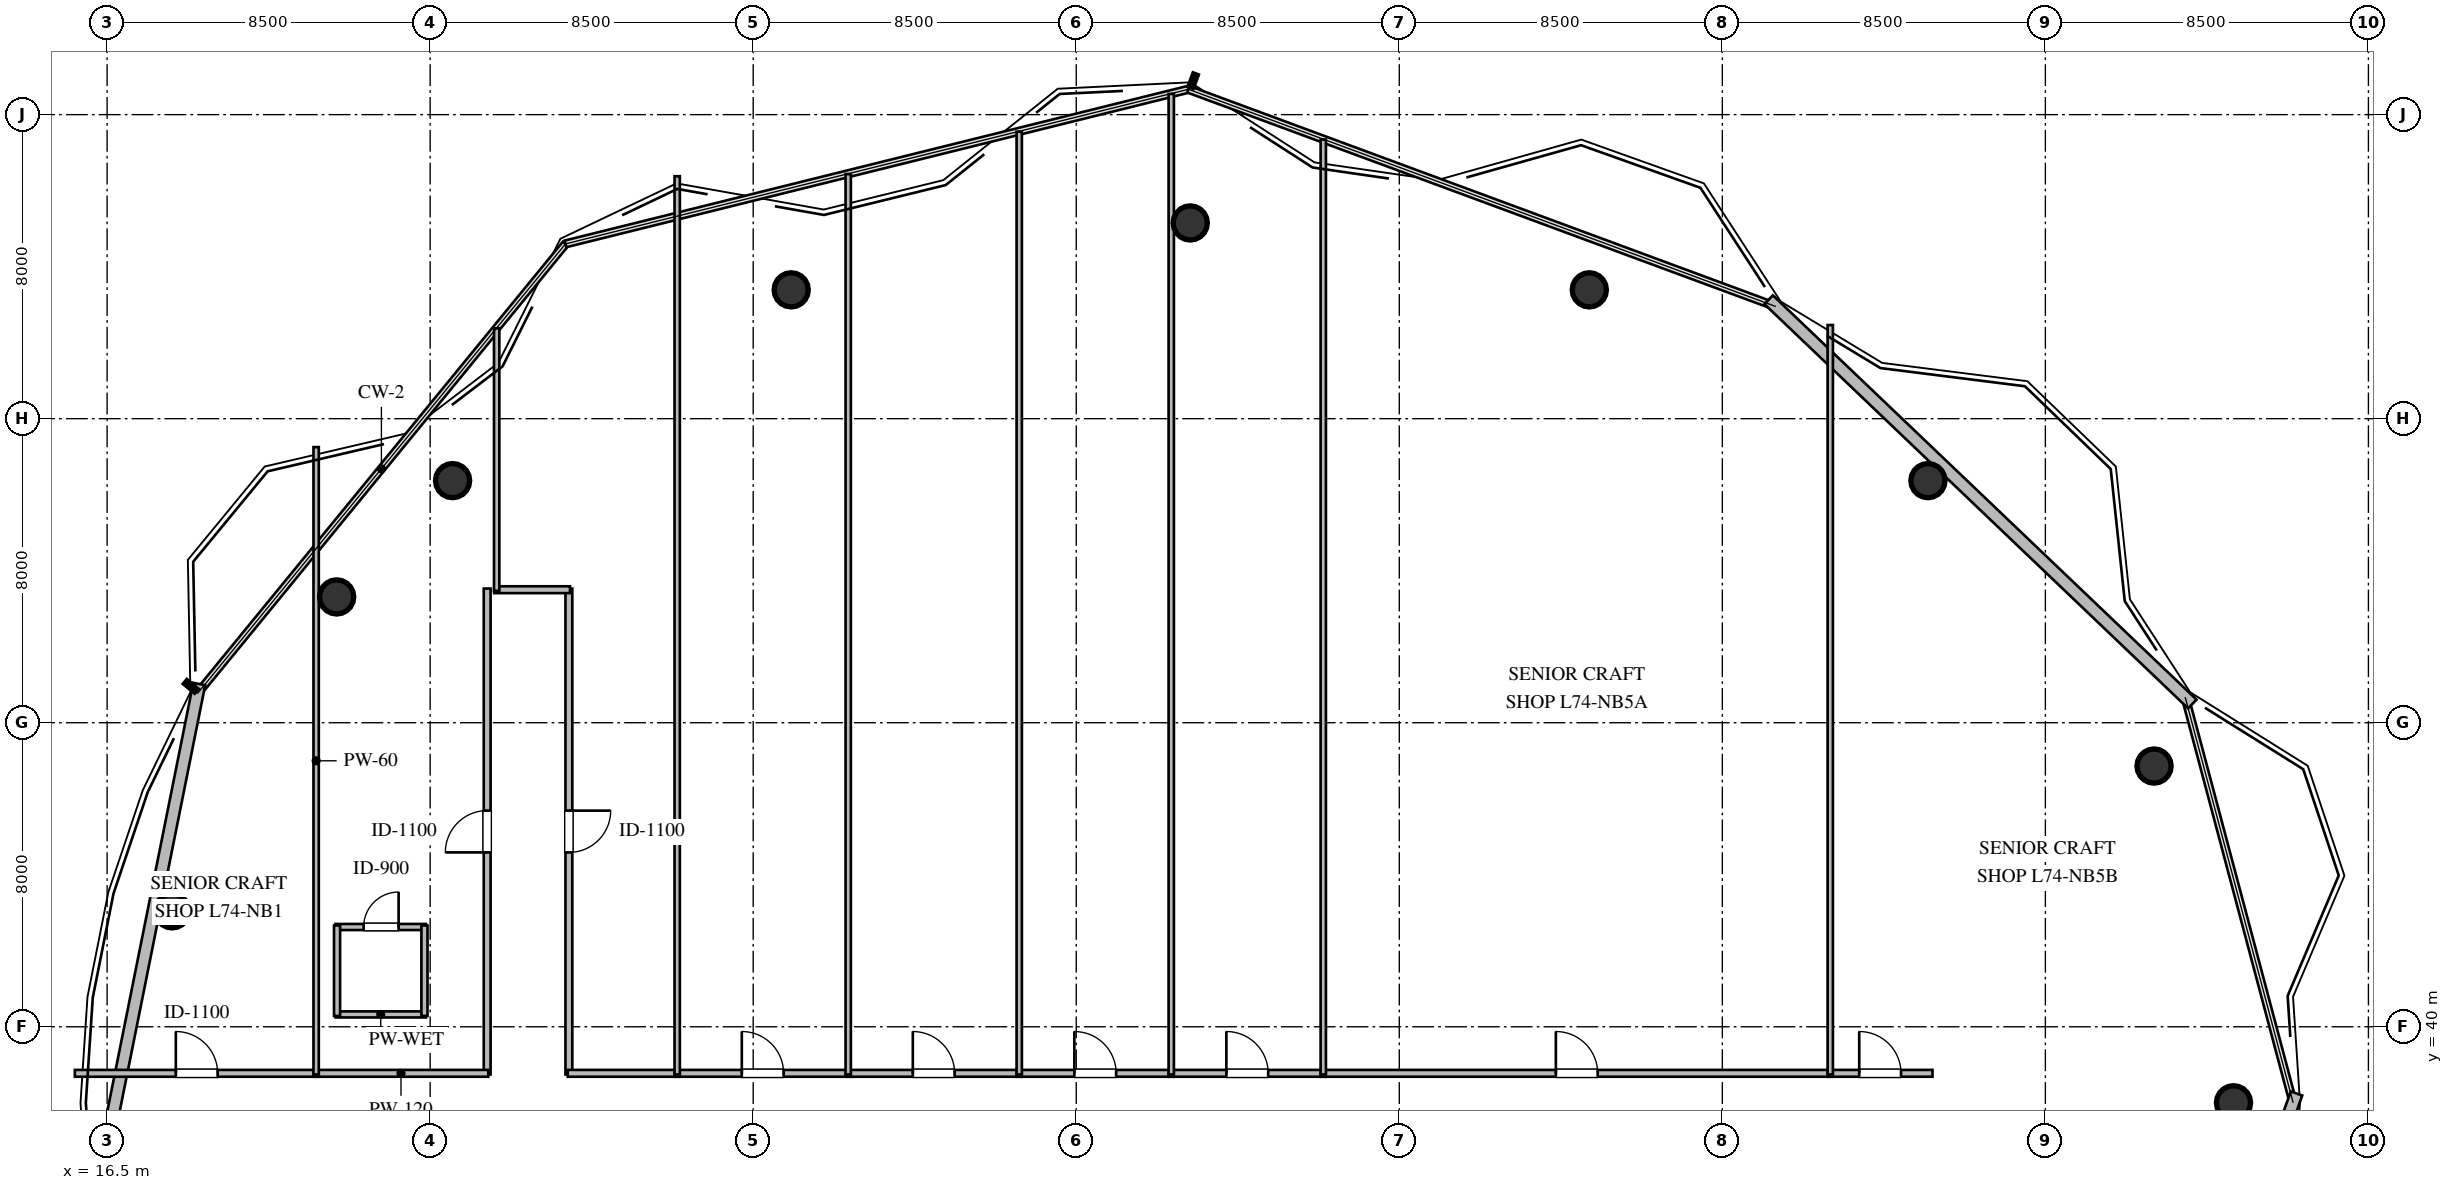
"""IFC4 building model, lengths in metres.
Left out: names, types, materials, properties, quantities, classifications, styles, units other than length and angle.
Written with IfcOpenShell. Run it as: python <this file> out.ifc"""

import sys

from ifc_helpers import new_model, si_unit, direction, frame, frame_2d, origin, origin_2d, place, context, subcontext, project, spatial, rectangle, circle, extrude, element, fill, save


model = new_model("IFC4")
c1 = context("Model", 3, precision=1e-05, world=origin(), true_north=direction((0.0, 1.0)))
c2 = subcontext(c1, "Body", "Model", "MODEL_VIEW")
j1 = project(units=[si_unit("LENGTHUNIT", "METRE"), si_unit("PLANEANGLEUNIT", "RADIAN")], contexts=[c1])
p1 = place(None, origin())
s1 = spatial("IfcSite", under=j1, at=p1, CompositionType="ELEMENT")
p2 = place(p1, origin())
s2 = spatial("IfcBuilding", under=s1, at=p2, CompositionType="ELEMENT")
p3 = place(p2, frame((0.0, 0.0, 281.4)))
s3 = spatial("IfcBuildingStorey", under=s2, at=p3, CompositionType="ELEMENT", Elevation=281.4)
for number, where, z_axis, x_axis in (
    (1, (72.45, 38.0, 0.0), (0.0, 0.0, 1.0), (1.0, 0.0, 0.0)),
    (2, (70.36, 46.86, 0.0), (0.0, 0.0, 1.0), (1.0, 0.0, 0.0)),
    (3, (64.41, 54.37, 0.0), (0.0, 0.0, 1.0), (1.0, 0.0, 0.0)),
    (4, (55.5, 59.39, 0.0), (0.0, 0.0, 1.0), (1.0, 0.0, 0.0)),
    (5, (45.0, 61.15, 0.0), (0.0, 0.0, 1.0), (1.0, 0.0, 0.0)),
    (6, (34.5, 59.39, 0.0), (0.0, 0.0, 1.0), (1.0, 0.0, 0.0)),
    (7, (25.59, 54.37, 0.0), (0.0, 0.0, 1.0), (1.0, 0.0, 0.0)),
    (8, (22.54, 51.31, 0.0), (0.0, 0.0, 1.0), (1.0, 0.0, 0.0)),
    (9, (18.21, 43.05, 0.0), (0.0, 0.0, 1.0), (1.0, 0.0, 0.0)),
):
    element("IfcColumn", number, at=place(p3, frame(where, z_axis=z_axis, x_axis=x_axis)), inside=s3, PredefinedType="COLUMN", context=c2, shape_type="SweptSolid", body=[
        extrude(circle(Radius=0.45, at=origin_2d()), origin(), (0.0, 0.0, 1.0), 3.8),
    ])
p4 = place(p3, frame((74.108, 38.245, 0.0), z_axis=(0.0, 0.0, 1.0), x_axis=(-0.337073777429, -0.941478235845, 0.0)))
e10 = element("IfcWall", 10, at=p4, inside=s3, PredefinedType="STANDARD", context=c2, shape_type="SweptSolid", body=[
    extrude(rectangle(XDim=13.673, YDim=0.32, at=frame_2d((6.837, 0.0))), origin(), (0.0, 0.0, 1.0), 3.56),
])
p5 = place(p3, frame((16.111, 34.999, 0.0), z_axis=(0.0, 0.0, 1.0), x_axis=(0.196720235208, 0.980459662128, 0.0)))
e11 = element("IfcWall", 11, at=p5, inside=s3, PredefinedType="STANDARD", context=c2, shape_type="SweptSolid", body=[
    extrude(rectangle(XDim=14.299, YDim=0.32, at=frame_2d((7.15, 0.0))), origin(), (0.0, 0.0, 1.0), 3.56),
])
p6 = place(p3, frame((60.219, 59.13, 0.0), z_axis=(0.0, 0.0, 1.0), x_axis=(0.723493659852, -0.690331025056, 0.0)))
e12 = element("IfcWall", 12, at=p6, inside=s3, PredefinedType="STANDARD", context=c2, shape_type="SweptSolid", body=[
    extrude(rectangle(XDim=15.408, YDim=0.32, at=frame_2d((7.704, 0.0))), origin(), (0.0, 0.0, 1.0), 3.56),
])
p7 = place(p3, frame((22.51, 40.325, 0.0), z_axis=(0.0, 0.0, 1.0), x_axis=(1.0, 0.0, 0.0)))
e13 = element("IfcWall", 13, at=p7, inside=s3, PredefinedType="PLUMBINGWALL", context=c2, shape_type="SweptSolid", body=[
    extrude(rectangle(XDim=2.38, YDim=0.16, at=frame_2d((1.19, 0.0))), origin(), (0.0, 0.0, 1.0), 3.56),
])
p8 = place(p3, frame((22.51, 42.625, 0.0), z_axis=(0.0, 0.0, 1.0), x_axis=(1.0, 0.0, 0.0)))
e14 = element("IfcWall", 14, at=p8, inside=s3, PredefinedType="PLUMBINGWALL", context=c2, shape_type="SweptSolid", body=[
    extrude(rectangle(XDim=2.38, YDim=0.16, at=frame_2d((1.19, 0.0))), origin(), (0.0, 0.0, 1.0), 3.56),
])
p9 = place(p8, frame((0.74, 0.0, 0.0)))
e15 = element("IfcOpeningElement", 15, at=p9, cuts=e14, PredefinedType="OPENING", context=c2, shape_type="SweptSolid", body=[
    extrude(rectangle(XDim=0.92, YDim=2.1, at=frame_2d((0.46, 1.05))), frame((0.0, 0.09, 0.0), z_axis=(0.0, -1.0, 0.0), x_axis=(1.0, 0.0, 0.0)), (0.0, 0.0, 1.0), 0.18),
])
p10 = place(p3, frame((22.55, 40.285, 0.0), z_axis=(0.0, 0.0, 1.0), x_axis=(0.0, 1.0, 0.0)))
e16 = element("IfcWall", 16, at=p10, inside=s3, PredefinedType="PLUMBINGWALL", context=c2, shape_type="SweptSolid", body=[
    extrude(rectangle(XDim=2.38, YDim=0.16, at=frame_2d((1.19, 0.0))), origin(), (0.0, 0.0, 1.0), 3.006),
])
p11 = place(p3, frame((24.85, 40.285, 0.0), z_axis=(0.0, 0.0, 1.0), x_axis=(0.0, 1.0, 0.0)))
e17 = element("IfcWall", 17, at=p11, inside=s3, PredefinedType="PLUMBINGWALL", context=c2, shape_type="SweptSolid", body=[
    extrude(rectangle(XDim=2.38, YDim=0.16, at=frame_2d((1.19, 0.0))), origin(), (0.0, 0.0, 1.0), 3.56),
])
p12 = place(p3, frame((15.651, 38.775, 0.0), z_axis=(0.0, 0.0, 1.0), x_axis=(1.0, 0.0, 0.0)))
e18 = element("IfcWall", 18, at=p12, inside=s3, PredefinedType="PARTITIONING", context=c2, shape_type="SweptSolid", body=[
    extrude(rectangle(XDim=6.414, YDim=0.18, at=frame_2d((3.207, 0.0))), origin(), (0.0, 0.0, 1.0), 3.56),
])
p13 = place(p12, frame((2.657, 0.0, 0.0)))
e19 = element("IfcOpeningElement", 19, at=p13, cuts=e18, PredefinedType="OPENING", context=c2, shape_type="SweptSolid", body=[
    extrude(rectangle(XDim=1.1, YDim=2.1, at=frame_2d((0.55, 1.05))), frame((0.0, 0.1, 0.0), z_axis=(0.0, -1.0, 0.0), x_axis=(1.0, 0.0, 0.0)), (0.0, 0.0, 1.0), 0.2),
])
p14 = place(p3, frame((26.5, 38.745, 0.0), z_axis=(0.0, 0.0, 1.0), x_axis=(0.0, 1.0, 0.0)))
e20 = element("IfcWall", 20, at=p14, inside=s3, PredefinedType="PARTITIONING", context=c2, shape_type="SweptSolid", body=[
    extrude(rectangle(XDim=12.785, YDim=0.18, at=frame_2d((6.393, 0.0))), origin(), (0.0, 0.0, 1.0), 3.56),
])
p15 = place(p14, frame((5.843, 0.0, 0.0)))
e21 = element("IfcOpeningElement", 21, at=p15, cuts=e20, PredefinedType="OPENING", context=c2, shape_type="SweptSolid", body=[
    extrude(rectangle(XDim=1.1, YDim=2.1, at=frame_2d((0.55, 1.05))), frame((0.0, 0.1, 0.0), z_axis=(0.0, -1.0, 0.0), x_axis=(1.0, 0.0, 0.0)), (0.0, 0.0, 1.0), 0.2),
])
p16 = place(p3, frame((21.935, 38.775, 0.0), z_axis=(0.0, 0.0, 1.0), x_axis=(1.0, 0.0, 0.0)))
e22 = element("IfcWall", 22, at=p16, inside=s3, PredefinedType="PARTITIONING", context=c2, shape_type="SweptSolid", body=[
    extrude(rectangle(XDim=4.595, YDim=0.18, at=frame_2d((2.297, 0.0))), origin(), (0.0, 0.0, 1.0), 3.56),
])
p17 = place(p3, frame((28.65, 51.53, 0.0), z_axis=(0.0, 0.0, 1.0), x_axis=(0.0, -1.0, 0.0)))
e23 = element("IfcWall", 23, at=p17, inside=s3, PredefinedType="PARTITIONING", context=c2, shape_type="SweptSolid", body=[
    extrude(rectangle(XDim=12.785, YDim=0.18, at=frame_2d((6.393, 0.0))), origin(), (0.0, 0.0, 1.0), 3.56),
])
p18 = place(p17, frame((5.843, 0.0, 0.0)))
e24 = element("IfcOpeningElement", 24, at=p18, cuts=e23, PredefinedType="OPENING", context=c2, shape_type="SweptSolid", body=[
    extrude(rectangle(XDim=1.1, YDim=2.1, at=frame_2d((0.55, 1.05))), frame((0.0, 0.1, 0.0), z_axis=(0.0, -1.0, 0.0), x_axis=(1.0, 0.0, 0.0)), (0.0, 0.0, 1.0), 0.2),
])
p19 = place(p3, frame((28.62, 38.775, 0.0), z_axis=(0.0, 0.0, 1.0), x_axis=(1.0, 0.0, 0.0)))
e25 = element("IfcWall", 25, at=p19, inside=s3, PredefinedType="PARTITIONING", context=c2, shape_type="SweptSolid", body=[
    extrude(rectangle(XDim=2.945, YDim=0.18, at=frame_2d((1.472, 0.0))), origin(), (0.0, 0.0, 1.0), 3.56),
])
p20 = place(p3, frame((26.685, 51.5, 0.0), z_axis=(0.0, 0.0, 1.0), x_axis=(1.0, 0.0, 0.0)))
e26 = element("IfcWall", 26, at=p20, inside=s3, PredefinedType="PARTITIONING", context=c2, shape_type="SweptSolid", body=[
    extrude(rectangle(XDim=1.995, YDim=0.18, at=frame_2d((0.998, 0.0))), origin(), (0.0, 0.0, 1.0), 3.56),
])
p21 = place(p3, frame((31.435, 38.775, 0.0), z_axis=(0.0, 0.0, 1.0), x_axis=(1.0, 0.0, 0.0)))
e27 = element("IfcWall", 27, at=p21, inside=s3, PredefinedType="PARTITIONING", context=c2, shape_type="SweptSolid", body=[
    extrude(rectangle(XDim=4.63, YDim=0.18, at=frame_2d((2.315, 0.0))), origin(), (0.0, 0.0, 1.0), 3.56),
])
p22 = place(p21, frame((1.765, 0.0, 0.0)))
e28 = element("IfcOpeningElement", 28, at=p22, cuts=e27, PredefinedType="OPENING", context=c2, shape_type="SweptSolid", body=[
    extrude(rectangle(XDim=1.1, YDim=2.1, at=frame_2d((0.55, 1.05))), frame((0.0, 0.1, 0.0), z_axis=(0.0, -1.0, 0.0), x_axis=(1.0, 0.0, 0.0)), (0.0, 0.0, 1.0), 0.2),
])
p23 = place(p3, frame((35.935, 38.775, 0.0), z_axis=(0.0, 0.0, 1.0), x_axis=(1.0, 0.0, 0.0)))
e29 = element("IfcWall", 29, at=p23, inside=s3, PredefinedType="PARTITIONING", context=c2, shape_type="SweptSolid", body=[
    extrude(rectangle(XDim=4.63, YDim=0.18, at=frame_2d((2.315, 0.0))), origin(), (0.0, 0.0, 1.0), 3.56),
])
p24 = place(p23, frame((1.765, 0.0, 0.0)))
e30 = element("IfcOpeningElement", 30, at=p24, cuts=e29, PredefinedType="OPENING", context=c2, shape_type="SweptSolid", body=[
    extrude(rectangle(XDim=1.1, YDim=2.1, at=frame_2d((0.55, 1.05))), frame((0.0, 0.1, 0.0), z_axis=(0.0, -1.0, 0.0), x_axis=(1.0, 0.0, 0.0)), (0.0, 0.0, 1.0), 0.2),
])
p25 = place(p3, frame((40.435, 38.775, 0.0), z_axis=(0.0, 0.0, 1.0), x_axis=(1.0, 0.0, 0.0)))
e31 = element("IfcWall", 31, at=p25, inside=s3, PredefinedType="PARTITIONING", context=c2, shape_type="SweptSolid", body=[
    extrude(rectangle(XDim=4.13, YDim=0.18, at=frame_2d((2.065, 0.0))), origin(), (0.0, 0.0, 1.0), 3.56),
])
p26 = place(p25, frame((1.515, 0.0, 0.0)))
e32 = element("IfcOpeningElement", 32, at=p26, cuts=e31, PredefinedType="OPENING", context=c2, shape_type="SweptSolid", body=[
    extrude(rectangle(XDim=1.1, YDim=2.1, at=frame_2d((0.55, 1.05))), frame((0.0, 0.1, 0.0), z_axis=(0.0, -1.0, 0.0), x_axis=(1.0, 0.0, 0.0)), (0.0, 0.0, 1.0), 0.2),
])
p27 = place(p3, frame((44.435, 38.775, 0.0), z_axis=(0.0, 0.0, 1.0), x_axis=(1.0, 0.0, 0.0)))
e33 = element("IfcWall", 33, at=p27, inside=s3, PredefinedType="PARTITIONING", context=c2, shape_type="SweptSolid", body=[
    extrude(rectangle(XDim=4.13, YDim=0.18, at=frame_2d((2.065, 0.0))), origin(), (0.0, 0.0, 1.0), 3.56),
])
p28 = place(p27, frame((1.515, 0.0, 0.0)))
e34 = element("IfcOpeningElement", 34, at=p28, cuts=e33, PredefinedType="OPENING", context=c2, shape_type="SweptSolid", body=[
    extrude(rectangle(XDim=1.1, YDim=2.1, at=frame_2d((0.55, 1.05))), frame((0.0, 0.1, 0.0), z_axis=(0.0, -1.0, 0.0), x_axis=(1.0, 0.0, 0.0)), (0.0, 0.0, 1.0), 0.2),
])
p29 = place(p3, frame((48.435, 38.775, 0.0), z_axis=(0.0, 0.0, 1.0), x_axis=(1.0, 0.0, 0.0)))
e35 = element("IfcWall", 35, at=p29, inside=s3, PredefinedType="PARTITIONING", context=c2, shape_type="SweptSolid", body=[
    extrude(rectangle(XDim=13.47, YDim=0.18, at=frame_2d((6.735, 0.0))), origin(), (0.0, 0.0, 1.0), 3.56),
])
p30 = place(p29, frame((6.185, 0.0, 0.0)))
e36 = element("IfcOpeningElement", 36, at=p30, cuts=e35, PredefinedType="OPENING", context=c2, shape_type="SweptSolid", body=[
    extrude(rectangle(XDim=1.1, YDim=2.1, at=frame_2d((0.55, 1.05))), frame((0.0, 0.1, 0.0), z_axis=(0.0, -1.0, 0.0), x_axis=(1.0, 0.0, 0.0)), (0.0, 0.0, 1.0), 0.2),
])
p31 = place(p3, frame((61.775, 38.775, 0.0), z_axis=(0.0, 0.0, 1.0), x_axis=(1.0, 0.0, 0.0)))
e37 = element("IfcWall", 37, at=p31, inside=s3, PredefinedType="PARTITIONING", context=c2, shape_type="SweptSolid", body=[
    extrude(rectangle(XDim=2.755, YDim=0.18, at=frame_2d((1.377, 0.0))), origin(), (0.0, 0.0, 1.0), 3.56),
])
p32 = place(p31, frame((0.827, 0.0, 0.0)))
e38 = element("IfcOpeningElement", 38, at=p32, cuts=e37, PredefinedType="OPENING", context=c2, shape_type="SweptSolid", body=[
    extrude(rectangle(XDim=1.1, YDim=2.1, at=frame_2d((0.55, 1.05))), frame((0.0, 0.1, 0.0), z_axis=(0.0, -1.0, 0.0), x_axis=(1.0, 0.0, 0.0)), (0.0, 0.0, 1.0), 0.2),
])
p33 = place(p3, frame((22.0, 55.252, 0.0), z_axis=(0.0, 0.0, 1.0), x_axis=(0.0, -1.0, 0.0)))
e39 = element("IfcWall", 39, at=p33, inside=s3, PredefinedType="PARTITIONING", context=c2, shape_type="SweptSolid", body=[
    extrude(rectangle(XDim=16.507, YDim=0.14, at=frame_2d((8.253, 0.0))), origin(), (0.0, 0.0, 1.0), 3.006),
])
p34 = place(p3, frame((26.75, 58.377, 0.0), z_axis=(0.0, 0.0, 1.0), x_axis=(0.0, -1.0, 0.0)))
e40 = element("IfcWall", 40, at=p34, inside=s3, PredefinedType="PARTITIONING", context=c2, shape_type="SweptSolid", body=[
    extrude(rectangle(XDim=6.907, YDim=0.14, at=frame_2d((3.453, 0.0))), origin(), (0.0, 0.0, 1.0), 3.56),
])
p35 = place(p3, frame((31.5, 62.379, 0.0), z_axis=(0.0, 0.0, 1.0), x_axis=(0.0, -1.0, 0.0)))
e41 = element("IfcWall", 41, at=p35, inside=s3, PredefinedType="PARTITIONING", context=c2, shape_type="SweptSolid", body=[
    extrude(rectangle(XDim=23.634, YDim=0.14, at=frame_2d((11.817, 0.0))), origin(), (0.0, 0.0, 1.0), 3.56),
])
p36 = place(p3, frame((36.0, 62.435, 0.0), z_axis=(0.0, 0.0, 1.0), x_axis=(0.0, -1.0, 0.0)))
e42 = element("IfcWall", 42, at=p36, inside=s3, PredefinedType="PARTITIONING", context=c2, shape_type="SweptSolid", body=[
    extrude(rectangle(XDim=23.69, YDim=0.14, at=frame_2d((11.845, 0.0))), origin(), (0.0, 0.0, 1.0), 3.006),
])
p37 = place(p3, frame((40.5, 63.552, 0.0), z_axis=(0.0, 0.0, 1.0), x_axis=(0.0, -1.0, 0.0)))
e43 = element("IfcWall", 43, at=p37, inside=s3, PredefinedType="PARTITIONING", context=c2, shape_type="SweptSolid", body=[
    extrude(rectangle(XDim=24.807, YDim=0.14, at=frame_2d((12.404, 0.0))), origin(), (0.0, 0.0, 1.0), 3.56),
])
p38 = place(p3, frame((44.5, 64.545, 0.0), z_axis=(0.0, 0.0, 1.0), x_axis=(0.0, -1.0, 0.0)))
e44 = element("IfcWall", 44, at=p38, inside=s3, PredefinedType="PARTITIONING", context=c2, shape_type="SweptSolid", body=[
    extrude(rectangle(XDim=25.8, YDim=0.14, at=frame_2d((12.9, 0.0))), origin(), (0.0, 0.0, 1.0), 3.006),
])
p39 = place(p3, frame((48.5, 63.344, 0.0), z_axis=(0.0, 0.0, 1.0), x_axis=(0.0, -1.0, 0.0)))
e45 = element("IfcWall", 45, at=p39, inside=s3, PredefinedType="PARTITIONING", context=c2, shape_type="SweptSolid", body=[
    extrude(rectangle(XDim=24.599, YDim=0.14, at=frame_2d((12.3, 0.0))), origin(), (0.0, 0.0, 1.0), 3.56),
])
p40 = place(p3, frame((61.84, 58.464, 0.0), z_axis=(0.0, 0.0, 1.0), x_axis=(0.0, -1.0, 0.0)))
e46 = element("IfcWall", 46, at=p40, inside=s3, PredefinedType="PARTITIONING", context=c2, shape_type="SweptSolid", body=[
    extrude(rectangle(XDim=19.719, YDim=0.14, at=frame_2d((9.859, 0.0))), origin(), (0.0, 0.0, 1.0), 3.56),
])
p41 = place(p9, origin())
e47 = element("IfcDoor", 47, at=p41, inside=s3, OperationType="SINGLE_SWING_RIGHT", PredefinedType="DOOR", context=c2, shape_type="SweptSolid", body=[
    extrude(rectangle(XDim=0.92, YDim=2.1, at=frame_2d((0.46, 1.05))), frame((0.0, 0.025, 0.0), z_axis=(0.0, -1.0, 0.0), x_axis=(1.0, 0.0, 0.0)), (0.0, 0.0, 1.0), 0.05),
])
fill(e15, e47)
p42 = place(p13, origin())
e48 = element("IfcDoor", 48, at=p42, inside=s3, OperationType="SINGLE_SWING_LEFT", PredefinedType="DOOR", context=c2, shape_type="SweptSolid", body=[
    extrude(rectangle(XDim=1.1, YDim=2.1, at=frame_2d((0.55, 1.05))), frame((0.0, 0.025, 0.0), z_axis=(0.0, -1.0, 0.0), x_axis=(1.0, 0.0, 0.0)), (0.0, 0.0, 1.0), 0.05),
])
fill(e19, e48)
p43 = place(p15, origin())
e49 = element("IfcDoor", 49, at=p43, inside=s3, OperationType="SINGLE_SWING_LEFT", PredefinedType="DOOR", context=c2, shape_type="SweptSolid", body=[
    extrude(rectangle(XDim=1.1, YDim=2.1, at=frame_2d((0.55, 1.05))), frame((0.0, 0.025, 0.0), z_axis=(0.0, -1.0, 0.0), x_axis=(1.0, 0.0, 0.0)), (0.0, 0.0, 1.0), 0.05),
])
fill(e21, e49)
p44 = place(p18, origin())
e50 = element("IfcDoor", 50, at=p44, inside=s3, OperationType="SINGLE_SWING_LEFT", PredefinedType="DOOR", context=c2, shape_type="SweptSolid", body=[
    extrude(rectangle(XDim=1.1, YDim=2.1, at=frame_2d((0.55, 1.05))), frame((0.0, 0.025, 0.0), z_axis=(0.0, -1.0, 0.0), x_axis=(1.0, 0.0, 0.0)), (0.0, 0.0, 1.0), 0.05),
])
fill(e24, e50)
p45 = place(p22, origin())
e51 = element("IfcDoor", 51, at=p45, inside=s3, OperationType="SINGLE_SWING_LEFT", PredefinedType="DOOR", context=c2, shape_type="SweptSolid", body=[
    extrude(rectangle(XDim=1.1, YDim=2.1, at=frame_2d((0.55, 1.05))), frame((0.0, 0.025, 0.0), z_axis=(0.0, -1.0, 0.0), x_axis=(1.0, 0.0, 0.0)), (0.0, 0.0, 1.0), 0.05),
])
fill(e28, e51)
p46 = place(p24, origin())
e52 = element("IfcDoor", 52, at=p46, inside=s3, OperationType="SINGLE_SWING_LEFT", PredefinedType="DOOR", context=c2, shape_type="SweptSolid", body=[
    extrude(rectangle(XDim=1.1, YDim=2.1, at=frame_2d((0.55, 1.05))), frame((0.0, 0.025, 0.0), z_axis=(0.0, -1.0, 0.0), x_axis=(1.0, 0.0, 0.0)), (0.0, 0.0, 1.0), 0.05),
])
fill(e30, e52)
p47 = place(p26, origin())
e53 = element("IfcDoor", 53, at=p47, inside=s3, OperationType="SINGLE_SWING_LEFT", PredefinedType="DOOR", context=c2, shape_type="SweptSolid", body=[
    extrude(rectangle(XDim=1.1, YDim=2.1, at=frame_2d((0.55, 1.05))), frame((0.0, 0.025, 0.0), z_axis=(0.0, -1.0, 0.0), x_axis=(1.0, 0.0, 0.0)), (0.0, 0.0, 1.0), 0.05),
])
fill(e32, e53)
p48 = place(p28, origin())
e54 = element("IfcDoor", 54, at=p48, inside=s3, OperationType="SINGLE_SWING_LEFT", PredefinedType="DOOR", context=c2, shape_type="SweptSolid", body=[
    extrude(rectangle(XDim=1.1, YDim=2.1, at=frame_2d((0.55, 1.05))), frame((0.0, 0.025, 0.0), z_axis=(0.0, -1.0, 0.0), x_axis=(1.0, 0.0, 0.0)), (0.0, 0.0, 1.0), 0.05),
])
fill(e34, e54)
p49 = place(p30, origin())
e55 = element("IfcDoor", 55, at=p49, inside=s3, OperationType="SINGLE_SWING_LEFT", PredefinedType="DOOR", context=c2, shape_type="SweptSolid", body=[
    extrude(rectangle(XDim=1.1, YDim=2.1, at=frame_2d((0.55, 1.05))), frame((0.0, 0.025, 0.0), z_axis=(0.0, -1.0, 0.0), x_axis=(1.0, 0.0, 0.0)), (0.0, 0.0, 1.0), 0.05),
])
fill(e36, e55)
p50 = place(p32, origin())
e56 = element("IfcDoor", 56, at=p50, inside=s3, OperationType="SINGLE_SWING_LEFT", PredefinedType="DOOR", context=c2, shape_type="SweptSolid", body=[
    extrude(rectangle(XDim=1.1, YDim=2.1, at=frame_2d((0.55, 1.05))), frame((0.0, 0.025, 0.0), z_axis=(0.0, -1.0, 0.0), x_axis=(1.0, 0.0, 0.0)), (0.0, 0.0, 1.0), 0.05),
])
fill(e38, e56)
save(model, sys.argv[1])
